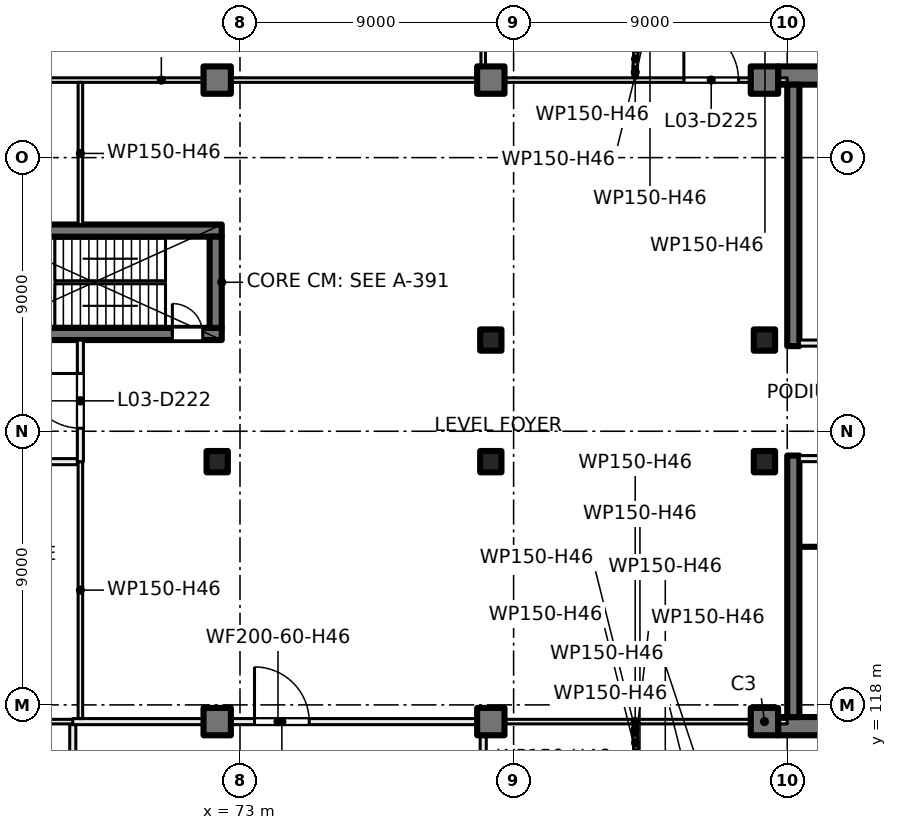
"""IFC4 building model, lengths in metres.
Left out: names, types, materials, properties, quantities, classifications, styles, units other than length and angle.
Written with IfcOpenShell. Run it as: python <this file> out.ifc"""

import sys

from ifc_helpers import new_model, si_unit, direction, frame, frame_2d, origin, origin_2d, place, context, subcontext, project, spatial, rectangle, extrude, element, fill, save


model = new_model("IFC4")
c1 = context("Model", 3, precision=1e-05, world=origin(), true_north=direction((0.0, 1.0)))
c2 = subcontext(c1, "Body", "Model", "MODEL_VIEW")
j1 = project(units=[si_unit("LENGTHUNIT", "METRE"), si_unit("PLANEANGLEUNIT", "RADIAN")], contexts=[c1])
p1 = place(None, origin())
s1 = spatial("IfcSite", under=j1, at=p1, CompositionType="ELEMENT")
p2 = place(p1, origin())
s2 = spatial("IfcBuilding", under=s1, at=p2, CompositionType="ELEMENT")
p3 = place(p2, frame((0.0, 0.0, 17.5)))
s3 = spatial("IfcBuildingStorey", under=s2, at=p3, CompositionType="ELEMENT", Elevation=17.5)
for number, where, z_axis, x_axis in (
    (1, (81.25, 130.0, 0.0), (0.0, 0.0, 1.0), (1.0, 0.0, 0.0)),
    (2, (90.25, 130.0, 0.0), (0.0, 0.0, 1.0), (1.0, 0.0, 0.0)),
    (3, (72.25, 126.0, 0.0), (0.0, 0.0, 1.0), (1.0, 0.0, 0.0)),
    (4, (81.25, 126.0, 0.0), (0.0, 0.0, 1.0), (1.0, 0.0, 0.0)),
    (5, (90.25, 126.0, 0.0), (0.0, 0.0, 1.0), (1.0, 0.0, 0.0)),
):
    element("IfcColumn", number, at=place(p3, frame(where, z_axis=z_axis, x_axis=x_axis)), inside=s3, PredefinedType="COLUMN", context=c2, shape_type="SweptSolid", body=[
        extrude(rectangle(XDim=0.7, YDim=0.7, at=origin_2d()), origin(), (0.0, 0.0, 1.0), 5.0),
    ])
for number, where, z_axis, x_axis in (
    (6, (72.25, 138.55, 0.0), (0.0, 0.0, 1.0), (1.0, 0.0, 0.0)),
    (7, (81.25, 138.55, 0.0), (0.0, 0.0, 1.0), (1.0, 0.0, 0.0)),
    (8, (90.25, 138.55, 0.0), (0.0, 0.0, 1.0), (1.0, 0.0, 0.0)),
    (9, (72.25, 117.45, 0.0), (0.0, 0.0, 1.0), (1.0, 0.0, 0.0)),
    (10, (81.25, 117.45, 0.0), (0.0, 0.0, 1.0), (1.0, 0.0, 0.0)),
    (11, (90.25, 117.45, 0.0), (0.0, 0.0, 1.0), (1.0, 0.0, 0.0)),
):
    element("IfcColumn", number, at=place(p3, frame(where, z_axis=z_axis, x_axis=x_axis)), inside=s3, PredefinedType="COLUMN", context=c2, shape_type="SweptSolid", body=[
        extrude(rectangle(XDim=0.9, YDim=0.9, at=origin_2d()), origin(), (0.0, 0.0, 1.0), 5.0),
    ])
for number, where, z_axis, x_axis in (
    (12, (99.6, 138.7, 0.0), (0.0, 0.0, 1.0), (-1.0, 0.0, 0.0)),
    (13, (99.6, 117.3, 0.0), (0.0, 0.0, 1.0), (-1.0, 0.0, 0.0)),
):
    element("IfcWall", number, at=place(p3, frame(where, z_axis=z_axis, x_axis=x_axis)), inside=s3, PredefinedType="SHEAR", context=c2, shape_type="SweptSolid", body=[
        extrude(rectangle(XDim=8.9, YDim=0.6, at=frame_2d((4.45, 0.0))), origin(), (0.0, 0.0, 1.0), 5.0),
    ])
for number, where, z_axis, x_axis in (
    (14, (91.2, 138.4, 0.0), (0.0, 0.0, 1.0), (0.0, -1.0, 0.0)),
    (15, (91.2, 126.2, 0.0), (0.0, 0.0, 1.0), (0.0, -1.0, 0.0)),
):
    element("IfcWall", number, at=place(p3, frame(where, z_axis=z_axis, x_axis=x_axis)), inside=s3, PredefinedType="SHEAR", context=c2, shape_type="SweptSolid", body=[
        extrude(rectangle(XDim=8.6, YDim=0.4, at=frame_2d((4.3, 0.0))), origin(), (0.0, 0.0, 1.0), 5.0),
    ])
p4 = place(p3, frame((63.6, 130.2, 0.0), z_axis=(0.0, 0.0, 1.0), x_axis=(1.0, 0.0, 0.0)))
e16 = element("IfcWall", 16, at=p4, inside=s3, PredefinedType="SHEAR", context=c2, shape_type="SweptSolid", body=[
    extrude(rectangle(XDim=8.8, YDim=0.4, at=frame_2d((4.4, 0.0))), origin(), (0.0, 0.0, 1.0), 5.0),
])
p5 = place(p4, frame((7.175, 0.0, 0.0)))
e17 = element("IfcOpeningElement", 17, at=p5, cuts=e16, PredefinedType="OPENING", context=c2, shape_type="SweptSolid", body=[
    extrude(rectangle(XDim=1.0, YDim=2.1, at=frame_2d((0.5, 1.05))), frame((0.0, 0.21, 0.0), z_axis=(0.0, -1.0, 0.0), x_axis=(1.0, 0.0, 0.0)), (0.0, 0.0, 1.0), 0.42),
])
p6 = place(p3, frame((64.0, 133.6, 0.0), z_axis=(0.0, 0.0, 1.0), x_axis=(1.0, 0.0, 0.0)))
e18 = element("IfcWall", 18, at=p6, inside=s3, PredefinedType="SHEAR", context=c2, shape_type="SweptSolid", body=[
    extrude(rectangle(XDim=8.4, YDim=0.4, at=frame_2d((4.2, 0.0))), origin(), (0.0, 0.0, 1.0), 5.0),
])
p7 = place(p3, frame((72.2, 130.4, 0.0), z_axis=(0.0, 0.0, 1.0), x_axis=(0.0, 1.0, 0.0)))
e19 = element("IfcWall", 19, at=p7, inside=s3, PredefinedType="SHEAR", context=c2, shape_type="SweptSolid", body=[
    extrude(rectangle(XDim=3.0, YDim=0.4, at=frame_2d((1.5, 0.0))), origin(), (0.0, 0.0, 1.0), 5.0),
])
p8 = place(p3, frame((95.2, 126.1, 0.0), z_axis=(0.0, 0.0, 1.0), x_axis=(-1.0, 0.0, 0.0)))
e20 = element("IfcWall", 20, at=p8, inside=s3, PredefinedType="PARTITIONING", context=c2, shape_type="SweptSolid", body=[
    extrude(rectangle(XDim=3.8, YDim=0.2, at=frame_2d((1.9, 0.0))), origin(), (0.0, 0.0, 1.0), 4.6),
])
p9 = place(p8, frame((0.3, 0.0, 0.0)))
e21 = element("IfcOpeningElement", 21, at=p9, cuts=e20, PredefinedType="OPENING", context=c2, shape_type="SweptSolid", body=[
    extrude(rectangle(XDim=1.2, YDim=2.1, at=frame_2d((0.6, 1.05))), frame((0.0, 0.11, 0.0), z_axis=(0.0, -1.0, 0.0), x_axis=(1.0, 0.0, 0.0)), (0.0, 0.0, 1.0), 0.22),
])
p10 = place(p3, frame((93.35, 123.2, 0.0), z_axis=(0.0, 0.0, 1.0), x_axis=(-1.0, 0.0, 0.0)))
e22 = element("IfcWall", 22, at=p10, inside=s3, PredefinedType="PARTITIONING", context=c2, shape_type="SweptSolid", body=[
    extrude(rectangle(XDim=1.95, YDim=0.1, at=frame_2d((0.975, 0.0))), origin(), (0.0, 0.0, 1.0), 4.6),
])
p11 = place(p3, frame((91.4, 129.9, 0.0), z_axis=(0.0, 0.0, 1.0), x_axis=(1.0, 0.0, 0.0)))
e23 = element("IfcWall", 23, at=p11, inside=s3, PredefinedType="PARTITIONING", context=c2, shape_type="SweptSolid", body=[
    extrude(rectangle(XDim=3.8, YDim=0.2, at=frame_2d((1.9, 0.0))), origin(), (0.0, 0.0, 1.0), 4.6),
])
p12 = place(p11, frame((2.3, 0.0, 0.0)))
e24 = element("IfcOpeningElement", 24, at=p12, cuts=e23, PredefinedType="OPENING", context=c2, shape_type="SweptSolid", body=[
    extrude(rectangle(XDim=1.2, YDim=2.1, at=frame_2d((0.6, 1.05))), frame((0.0, 0.11, 0.0), z_axis=(0.0, -1.0, 0.0), x_axis=(1.0, 0.0, 0.0)), (0.0, 0.0, 1.0), 0.22),
])
p13 = place(p3, frame((49.825, 117.45, 0.0), z_axis=(0.0, 0.0, 1.0), x_axis=(1.0, 0.0, 0.0)))
e25 = element("IfcWall", 25, at=p13, inside=s3, PredefinedType="PARTITIONING", context=c2, shape_type="SweptSolid", body=[
    extrude(rectangle(XDim=17.675, YDim=0.15, at=frame_2d((8.837, 0.0))), origin(), (0.0, 0.0, 1.0), 4.6),
])
p14 = place(p3, frame((67.65, 126.0, 0.0), z_axis=(0.0, 0.0, 1.0), x_axis=(-1.0, 0.0, 0.0)))
e26 = element("IfcWall", 26, at=p14, inside=s3, PredefinedType="PARTITIONING", context=c2, shape_type="SweptSolid", body=[
    extrude(rectangle(XDim=17.8, YDim=0.2, at=frame_2d((8.9, 0.0))), origin(), (0.0, 0.0, 1.0), 4.6),
])
p15 = place(p14, frame((15.148, 0.0, 0.0)))
e27 = element("IfcOpeningElement", 27, at=p15, cuts=e26, PredefinedType="OPENING", context=c2, shape_type="SweptSolid", body=[
    extrude(rectangle(XDim=1.0, YDim=2.1, at=frame_2d((0.5, 1.05))), frame((0.0, 0.11, 0.0), z_axis=(0.0, -1.0, 0.0), x_axis=(1.0, 0.0, 0.0)), (0.0, 0.0, 1.0), 0.22),
])
p16 = place(p14, frame((10.65, 0.0, 0.0)))
e28 = element("IfcOpeningElement", 28, at=p16, cuts=e26, PredefinedType="OPENING", context=c2, shape_type="SweptSolid", body=[
    extrude(rectangle(XDim=1.0, YDim=2.1, at=frame_2d((0.5, 1.05))), frame((0.0, 0.11, 0.0), z_axis=(0.0, -1.0, 0.0), x_axis=(1.0, 0.0, 0.0)), (0.0, 0.0, 1.0), 0.22),
])
p17 = place(p14, frame((3.002, 0.0, 0.0)))
e29 = element("IfcOpeningElement", 29, at=p17, cuts=e26, PredefinedType="OPENING", context=c2, shape_type="SweptSolid", body=[
    extrude(rectangle(XDim=1.0, YDim=2.1, at=frame_2d((0.5, 1.05))), frame((0.0, 0.11, 0.0), z_axis=(0.0, -1.0, 0.0), x_axis=(1.0, 0.0, 0.0)), (0.0, 0.0, 1.0), 0.22),
])
p18 = place(p3, frame((49.825, 138.55, 0.0), z_axis=(0.0, 0.0, 1.0), x_axis=(1.0, 0.0, 0.0)))
e30 = element("IfcWall", 30, at=p18, inside=s3, PredefinedType="PARTITIONING", context=c2, shape_type="SweptSolid", body=[
    extrude(rectangle(XDim=41.175, YDim=0.15, at=frame_2d((20.587, 0.0))), origin(), (0.0, 0.0, 1.0), 4.6),
])
p19 = place(p18, frame((37.775, 0.0, 0.0)))
e31 = element("IfcOpeningElement", 31, at=p19, cuts=e30, PredefinedType="OPENING", context=c2, shape_type="SweptSolid", body=[
    extrude(rectangle(XDim=1.8, YDim=2.1, at=frame_2d((0.9, 1.05))), frame((0.0, 0.085, 0.0), z_axis=(0.0, -1.0, 0.0), x_axis=(1.0, 0.0, 0.0)), (0.0, 0.0, 1.0), 0.17),
])
p20 = place(p3, frame((67.5, 109.1, 0.0), z_axis=(0.0, 0.0, 1.0), x_axis=(0.0, 1.0, 0.0)))
e32 = element("IfcWall", 32, at=p20, inside=s3, PredefinedType="PARTITIONING", context=c2, shape_type="SweptSolid", body=[
    extrude(rectangle(XDim=8.25, YDim=0.2, at=frame_2d((4.125, 0.0))), origin(), (0.0, 0.0, 1.0), 3.6),
])
p21 = place(p3, frame((67.5, 117.45, 0.0), z_axis=(0.0, 0.0, 1.0), x_axis=(1.0, 0.0, 0.0)))
e33 = element("IfcWall", 33, at=p21, inside=s3, PredefinedType="PARTITIONING", context=c2, shape_type="SweptSolid", body=[
    extrude(rectangle(XDim=13.5, YDim=0.2, at=frame_2d((6.75, 0.0))), origin(), (0.0, 0.0, 1.0), 4.6),
])
p22 = place(p21, frame((5.977, 0.0, 0.0)))
e34 = element("IfcOpeningElement", 34, at=p22, cuts=e33, PredefinedType="OPENING", context=c2, shape_type="SweptSolid", body=[
    extrude(rectangle(XDim=1.8, YDim=2.1, at=frame_2d((0.9, 1.05))), frame((0.0, 0.11, 0.0), z_axis=(0.0, -1.0, 0.0), x_axis=(1.0, 0.0, 0.0)), (0.0, 0.0, 1.0), 0.22),
])
p23 = place(p3, frame((67.75, 117.55, 0.0), z_axis=(0.0, 0.0, 1.0), x_axis=(0.0, 1.0, 0.0)))
e35 = element("IfcWall", 35, at=p23, inside=s3, PredefinedType="PARTITIONING", context=c2, shape_type="SweptSolid", body=[
    extrude(rectangle(XDim=8.45, YDim=0.15, at=frame_2d((4.225, 0.0))), origin(), (0.0, 0.0, 1.0), 4.6),
])
p24 = place(p3, frame((67.75, 130.0, 0.0), z_axis=(0.0, 0.0, 1.0), x_axis=(0.0, -1.0, 0.0)))
e36 = element("IfcWall", 36, at=p24, inside=s3, PredefinedType="PARTITIONING", context=c2, shape_type="SweptSolid", body=[
    extrude(rectangle(XDim=4.0, YDim=0.2, at=frame_2d((2.0, 0.0))), origin(), (0.0, 0.0, 1.0), 4.6),
])
p25 = place(p24, frame((1.1, 0.0, 0.0)))
e37 = element("IfcOpeningElement", 37, at=p25, cuts=e36, PredefinedType="OPENING", context=c2, shape_type="SweptSolid", body=[
    extrude(rectangle(XDim=1.8, YDim=2.1, at=frame_2d((0.9, 1.05))), frame((0.0, 0.11, 0.0), z_axis=(0.0, -1.0, 0.0), x_axis=(1.0, 0.0, 0.0)), (0.0, 0.0, 1.0), 0.22),
])
p26 = place(p3, frame((67.75, 133.8, 0.0), z_axis=(0.0, 0.0, 1.0), x_axis=(0.0, 1.0, 0.0)))
e38 = element("IfcWall", 38, at=p26, inside=s3, PredefinedType="PARTITIONING", context=c2, shape_type="SweptSolid", body=[
    extrude(rectangle(XDim=4.675, YDim=0.15, at=frame_2d((2.337, 0.0))), origin(), (0.0, 0.0, 1.0), 4.6),
])
p27 = place(p3, frame((81.0, 109.1, 0.0), z_axis=(0.0, 0.0, 1.0), x_axis=(0.0, 1.0, 0.0)))
e39 = element("IfcWall", 39, at=p27, inside=s3, PredefinedType="PARTITIONING", context=c2, shape_type="SweptSolid", body=[
    extrude(rectangle(XDim=8.25, YDim=0.2, at=frame_2d((4.125, 0.0))), origin(), (0.0, 0.0, 1.0), 3.6),
])
p28 = place(p3, frame((81.0, 117.45, 0.0), z_axis=(0.0, 0.0, 1.0), x_axis=(1.0, 0.0, 0.0)))
e40 = element("IfcWall", 40, at=p28, inside=s3, PredefinedType="PARTITIONING", context=c2, shape_type="SweptSolid", body=[
    extrude(rectangle(XDim=10.0, YDim=0.15, at=frame_2d((5.0, 0.0))), origin(), (0.0, 0.0, 1.0), 4.6),
])
p29 = place(p3, frame((81.0, 138.625, 0.0), z_axis=(0.0, 0.0, 1.0), x_axis=(0.0, 1.0, 0.0)))
e41 = element("IfcWall", 41, at=p29, inside=s3, PredefinedType="PARTITIONING", context=c2, shape_type="SweptSolid", body=[
    extrude(rectangle(XDim=7.775, YDim=0.15, at=frame_2d((3.887, 0.0))), origin(), (0.0, 0.0, 1.0), 4.6),
])
p30 = place(p3, frame((86.0, 116.998, 0.0), z_axis=(0.0, 0.0, 1.0), x_axis=(0.0, 1.0, 0.0)))
e42 = element("IfcWall", 42, at=p30, inside=s3, PredefinedType="PARTITIONING", context=c2, shape_type="SweptSolid", body=[
    extrude(rectangle(XDim=0.377, YDim=0.15, at=frame_2d((0.188, 0.0))), origin(), (0.0, 0.0, 1.0), 4.6),
])
p31 = place(p3, frame((86.0, 117.002, 0.0), z_axis=(0.0, 0.0, 1.0), x_axis=(0.048196018647, -0.998837896651, 0.0)))
e43 = element("IfcWall", 43, at=p31, inside=s3, PredefinedType="PARTITIONING", context=c2, shape_type="SweptSolid", body=[
    extrude(rectangle(XDim=0.496, YDim=0.15, at=frame_2d((0.248, 0.0))), origin(), (0.0, 0.0, 1.0), 4.6),
])
p32 = place(p3, frame((86.0, 138.625, 0.0), z_axis=(0.0, 0.0, 1.0), x_axis=(0.0, 1.0, 0.0)))
e44 = element("IfcWall", 44, at=p32, inside=s3, PredefinedType="PARTITIONING", context=c2, shape_type="SweptSolid", body=[
    extrude(rectangle(XDim=0.377, YDim=0.15, at=frame_2d((0.188, 0.0))), origin(), (0.0, 0.0, 1.0), 4.6),
])
p33 = place(p3, frame((86.0, 138.998, 0.0), z_axis=(0.0, 0.0, 1.0), x_axis=(0.048196018647, 0.998837896651, 0.0)))
e45 = element("IfcWall", 45, at=p33, inside=s3, PredefinedType="PARTITIONING", context=c2, shape_type="SweptSolid", body=[
    extrude(rectangle(XDim=0.496, YDim=0.15, at=frame_2d((0.248, 0.0))), origin(), (0.0, 0.0, 1.0), 4.6),
])
p34 = place(p3, frame((86.023, 139.486, 0.0), z_axis=(0.0, 0.0, 1.0), x_axis=(0.148412307247, 0.988925572052, 0.0)))
e46 = element("IfcWall", 46, at=p34, inside=s3, PredefinedType="PARTITIONING", context=c2, shape_type="SweptSolid", body=[
    extrude(rectangle(XDim=0.499, YDim=0.15, at=frame_2d((0.249, 0.0))), origin(), (0.0, 0.0, 1.0), 4.6),
])
p35 = place(p5, origin())
e47 = element("IfcDoor", 47, at=p35, inside=s3, OperationType="SINGLE_SWING_LEFT", PredefinedType="DOOR", context=c2, shape_type="SweptSolid", body=[
    extrude(rectangle(XDim=1.0, YDim=2.1, at=frame_2d((0.5, 1.05))), frame((0.0, 0.025, 0.0), z_axis=(0.0, -1.0, 0.0), x_axis=(1.0, 0.0, 0.0)), (0.0, 0.0, 1.0), 0.05),
])
fill(e17, e47)
p36 = place(p25, origin())
e48 = element("IfcDoor", 48, at=p36, inside=s3, OperationType="DOUBLE_DOOR_SINGLE_SWING", PredefinedType="DOOR", context=c2, shape_type="SweptSolid", body=[
    extrude(rectangle(XDim=1.8, YDim=2.1, at=frame_2d((0.9, 1.05))), frame((0.0, 0.025, 0.0), z_axis=(0.0, -1.0, 0.0), x_axis=(1.0, 0.0, 0.0)), (0.0, 0.0, 1.0), 0.05),
])
fill(e37, e48)
p37 = place(p22, origin())
e49 = element("IfcDoor", 49, at=p37, inside=s3, OperationType="DOUBLE_DOOR_SINGLE_SWING", PredefinedType="DOOR", context=c2, shape_type="SweptSolid", body=[
    extrude(rectangle(XDim=1.8, YDim=2.1, at=frame_2d((0.9, 1.05))), frame((0.0, 0.025, 0.0), z_axis=(0.0, -1.0, 0.0), x_axis=(1.0, 0.0, 0.0)), (0.0, 0.0, 1.0), 0.05),
])
fill(e34, e49)
p38 = place(p19, origin())
e50 = element("IfcDoor", 50, at=p38, inside=s3, OperationType="DOUBLE_DOOR_SINGLE_SWING", PredefinedType="DOOR", context=c2, shape_type="SweptSolid", body=[
    extrude(rectangle(XDim=1.8, YDim=2.1, at=frame_2d((0.9, 1.05))), frame((0.0, 0.025, 0.0), z_axis=(0.0, -1.0, 0.0), x_axis=(1.0, 0.0, 0.0)), (0.0, 0.0, 1.0), 0.05),
])
fill(e31, e50)
save(model, sys.argv[1])
